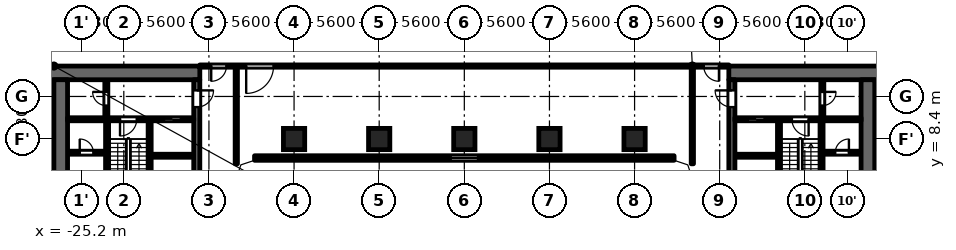
"""IFC4 building model, lengths in metres.
Left out: names, types, materials, properties, quantities, classifications, styles, units other than length and angle.
Written with IfcOpenShell. Run it as: python <this file> out.ifc"""

import sys

from ifc_helpers import new_model, si_unit, direction, frame, frame_2d, origin, origin_2d, place, context, subcontext, project, spatial, polyline, rectangle, outline, extrude, element, fill, save


model = new_model("IFC4")
c1 = context("Model", 3, precision=1e-05, world=origin(), true_north=direction((0.0, 1.0)))
c2 = subcontext(c1, "Body", "Model", "MODEL_VIEW")
j1 = project(units=[si_unit("LENGTHUNIT", "METRE"), si_unit("PLANEANGLEUNIT", "RADIAN")], contexts=[c1])
p1 = place(None, origin())
s1 = spatial("IfcSite", under=j1, at=p1, CompositionType="ELEMENT")
p2 = place(p1, origin())
s2 = spatial("IfcBuilding", under=s1, at=p2, CompositionType="ELEMENT")
p3 = place(p2, frame((0.0, 0.0, 25.7)))
s3 = spatial("IfcBuildingStorey", under=s2, at=p3, CompositionType="ELEMENT", Elevation=25.7)
for number, where, z_axis, x_axis in (
    (1, (-11.2, 8.4, 0.0), (0.0, 0.0, 1.0), (1.0, 0.0, 0.0)),
    (2, (-5.6, 8.4, 0.0), (0.0, 0.0, 1.0), (1.0, 0.0, 0.0)),
    (3, (0.0, 8.4, 0.0), (0.0, 0.0, 1.0), (1.0, 0.0, 0.0)),
    (4, (5.6, 8.4, 0.0), (0.0, 0.0, 1.0), (1.0, 0.0, 0.0)),
    (5, (11.2, 8.4, 0.0), (0.0, 0.0, 1.0), (1.0, 0.0, 0.0)),
):
    element("IfcColumn", number, at=place(p3, frame(where, z_axis=z_axis, x_axis=x_axis)), inside=s3, PredefinedType="COLUMN", context=c2, shape_type="SweptSolid", body=[
        extrude(rectangle(XDim=1.4, YDim=1.4, at=origin_2d()), origin(), (0.0, 0.0, 1.0), 4.8),
    ])
p4 = place(p3, frame((-13.8, 7.15, 0.0), z_axis=(0.0, 0.0, 1.0), x_axis=(1.0, 0.0, 0.0)))
e6 = element("IfcWall", 6, at=p4, inside=s3, PredefinedType="SOLIDWALL", context=c2, shape_type="SweptSolid", body=[
    extrude(rectangle(XDim=27.6, YDim=0.3, at=frame_2d((13.8, 0.0))), origin(), (0.0, 0.0, 1.0), 4.45),
])
p5 = place(p4, frame((12.9, 0.0, 0.9)))
e7 = element("IfcOpeningElement", 7, at=p5, cuts=e6, PredefinedType="OPENING", context=c2, shape_type="SweptSolid", body=[
    extrude(rectangle(XDim=1.8, YDim=1.25, at=frame_2d((0.9, 0.625))), frame((0.0, 0.16, 0.0), z_axis=(0.0, -1.0, 0.0), x_axis=(1.0, 0.0, 0.0)), (0.0, 0.0, 1.0), 0.32),
])
p6 = place(p3, frame((-20.7, 2.6, 0.0), z_axis=(0.0, 0.0, 1.0), x_axis=(0.0, 1.0, 0.0)))
e8 = element("IfcWall", 8, at=p6, inside=s3, PredefinedType="SHEAR", context=c2, shape_type="SweptSolid", body=[
    extrude(rectangle(XDim=7.0, YDim=0.2, at=frame_2d((3.5, 0.0))), origin(), (0.0, 0.0, 1.0), 4.45),
])
p7 = place(p3, frame((-17.4, 12.75, 0.0), z_axis=(0.0, 0.0, 1.0), x_axis=(-1.0, 0.0, 0.0)))
e9 = element("IfcWall", 9, at=p7, inside=s3, PredefinedType="SHEAR", context=c2, shape_type="SweptSolid", body=[
    extrude(rectangle(XDim=10.4, YDim=0.9, at=frame_2d((5.2, 0.0))), origin(), (0.0, 0.0, 1.0), 4.45),
])
p8 = place(p3, frame((-17.6, -12.3, 0.0), z_axis=(0.0, 0.0, 1.0), x_axis=(0.0, 1.0, 0.0)))
e10 = element("IfcWall", 10, at=p8, inside=s3, PredefinedType="SHEAR", context=c2, shape_type="SweptSolid", body=[
    extrude(rectangle(XDim=24.6, YDim=0.4, at=frame_2d((12.3, 0.0))), origin(), (0.0, 0.0, 1.0), 4.45),
])
p9 = place(p8, frame((6.0, 0.0, 0.0)))
e11 = element("IfcOpeningElement", 11, at=p9, cuts=e10, PredefinedType="OPENING", context=c2, shape_type="SweptSolid", body=[
    extrude(rectangle(XDim=1.1, YDim=2.1, at=frame_2d((0.55, 1.05))), frame((0.0, 0.21, 0.0), z_axis=(0.0, -1.0, 0.0), x_axis=(1.0, 0.0, 0.0)), (0.0, 0.0, 1.0), 0.42),
])
p10 = place(p8, frame((8.4, 0.0, 0.0)))
e12 = element("IfcOpeningElement", 12, at=p10, cuts=e10, PredefinedType="OPENING", context=c2, shape_type="SweptSolid", body=[
    extrude(rectangle(XDim=1.1, YDim=2.1, at=frame_2d((0.55, 1.05))), frame((0.0, 0.21, 0.0), z_axis=(0.0, -1.0, 0.0), x_axis=(1.0, 0.0, 0.0)), (0.0, 0.0, 1.0), 0.42),
])
p11 = place(p8, frame((10.8, 0.0, 0.0)))
e13 = element("IfcOpeningElement", 13, at=p11, cuts=e10, PredefinedType="OPENING", context=c2, shape_type="SweptSolid", body=[
    extrude(rectangle(XDim=1.1, YDim=2.1, at=frame_2d((0.55, 1.05))), frame((0.0, 0.21, 0.0), z_axis=(0.0, -1.0, 0.0), x_axis=(1.0, 0.0, 0.0)), (0.0, 0.0, 1.0), 0.42),
])
p12 = place(p8, frame((16.75, 0.0, 0.0)))
e14 = element("IfcOpeningElement", 14, at=p12, cuts=e10, PredefinedType="OPENING", context=c2, shape_type="SweptSolid", body=[
    extrude(rectangle(XDim=0.9, YDim=2.1, at=frame_2d((0.45, 1.05))), frame((0.0, 0.21, 0.0), z_axis=(0.0, -1.0, 0.0), x_axis=(1.0, 0.0, 0.0)), (0.0, 0.0, 1.0), 0.42),
])
p13 = place(p8, frame((22.8, 0.0, 0.0)))
e15 = element("IfcOpeningElement", 15, at=p13, cuts=e10, PredefinedType="OPENING", context=c2, shape_type="SweptSolid", body=[
    extrude(rectangle(XDim=1.1, YDim=2.1, at=frame_2d((0.55, 1.05))), frame((0.0, 0.21, 0.0), z_axis=(0.0, -1.0, 0.0), x_axis=(1.0, 0.0, 0.0)), (0.0, 0.0, 1.0), 0.42),
])
p14 = place(p8, frame((0.7, 0.0, 0.0)))
e16 = element("IfcOpeningElement", 16, at=p14, cuts=e10, PredefinedType="OPENING", context=c2, shape_type="SweptSolid", body=[
    extrude(rectangle(XDim=1.1, YDim=2.1, at=frame_2d((0.55, 1.05))), frame((0.0, 0.21, 0.0), z_axis=(0.0, -1.0, 0.0), x_axis=(1.0, 0.0, 0.0)), (0.0, 0.0, 1.0), 0.42),
])
p15 = place(p8, frame((12.775, 0.0, 0.0)))
e17 = element("IfcOpeningElement", 17, at=p15, cuts=e10, PredefinedType="OPENING", context=c2, shape_type="SweptSolid", body=[
    extrude(rectangle(XDim=1.8, YDim=2.1, at=frame_2d((0.9, 1.05))), frame((0.0, 0.21, 0.0), z_axis=(0.0, -1.0, 0.0), x_axis=(1.0, 0.0, 0.0)), (0.0, 0.0, 1.0), 0.42),
])
p16 = place(p3, frame((-26.55, -12.3, 0.0), z_axis=(0.0, 0.0, 1.0), x_axis=(0.0, 1.0, 0.0)))
e18 = element("IfcWall", 18, at=p16, inside=s3, PredefinedType="SHEAR", context=c2, shape_type="SweptSolid", body=[
    extrude(rectangle(XDim=24.6, YDim=0.9, at=frame_2d((12.3, 0.0))), origin(), (0.0, 0.0, 1.0), 4.45),
])
p17 = place(p3, frame((-23.55, 9.8, 0.0), z_axis=(0.0, 0.0, 1.0), x_axis=(0.0, 1.0, 0.0)))
e19 = element("IfcWall", 19, at=p17, inside=s3, PredefinedType="PARTITIONING", context=c2, shape_type="SweptSolid", body=[
    extrude(rectangle(XDim=2.5, YDim=0.2, at=frame_2d((1.25, 0.0))), origin(), (0.0, 0.0, 1.0), 4.45),
])
p18 = place(p17, frame((0.8, 0.0, 0.0)))
e20 = element("IfcOpeningElement", 20, at=p18, cuts=e19, PredefinedType="OPENING", context=c2, shape_type="SweptSolid", body=[
    extrude(rectangle(XDim=0.9, YDim=2.1, at=frame_2d((0.45, 1.05))), frame((0.0, 0.11, 0.0), z_axis=(0.0, -1.0, 0.0), x_axis=(1.0, 0.0, 0.0)), (0.0, 0.0, 1.0), 0.22),
])
p19 = place(p3, frame((-23.6, 7.5, 0.0), z_axis=(0.0, 0.0, 1.0), x_axis=(-1.0, 0.0, 0.0)))
e21 = element("IfcWall", 21, at=p19, inside=s3, PredefinedType="PARTITIONING", context=c2, shape_type="SweptSolid", body=[
    extrude(rectangle(XDim=2.5, YDim=0.2, at=frame_2d((1.25, 0.0))), origin(), (0.0, 0.0, 1.0), 4.45),
])
p20 = place(p19, frame((0.8, 0.0, 0.0)))
e22 = element("IfcOpeningElement", 22, at=p20, cuts=e21, PredefinedType="OPENING", context=c2, shape_type="SweptSolid", body=[
    extrude(rectangle(XDim=0.9, YDim=2.1, at=frame_2d((0.45, 1.05))), frame((0.0, 0.11, 0.0), z_axis=(0.0, -1.0, 0.0), x_axis=(1.0, 0.0, 0.0)), (0.0, 0.0, 1.0), 0.22),
])
p21 = place(p3, frame((-17.8, 7.3, 0.0), z_axis=(0.0, 0.0, 1.0), x_axis=(-1.0, 0.0, 0.0)))
e23 = element("IfcWall", 23, at=p21, inside=s3, PredefinedType="PARTITIONING", context=c2, shape_type="SweptSolid", body=[
    extrude(rectangle(XDim=2.8, YDim=0.2, at=frame_2d((1.4, 0.0))), origin(), (0.0, 0.0, 1.0), 4.45),
])
p22 = place(p3, frame((-17.8, 9.7, 0.0), z_axis=(0.0, 0.0, 1.0), x_axis=(-1.0, 0.0, 0.0)))
e24 = element("IfcWall", 24, at=p22, inside=s3, PredefinedType="SHEAR", context=c2, shape_type="SweptSolid", body=[
    extrude(rectangle(XDim=8.3, YDim=0.2, at=frame_2d((4.15, 0.0))), origin(), (0.0, 0.0, 1.0), 4.45),
])
p23 = place(p22, frame((0.85, 0.0, 0.0)))
e25 = element("IfcOpeningElement", 25, at=p23, cuts=e24, PredefinedType="OPENING", context=c2, shape_type="SweptSolid", body=[
    extrude(rectangle(XDim=1.1, YDim=2.1, at=frame_2d((0.55, 1.05))), frame((0.0, 0.11, 0.0), z_axis=(0.0, -1.0, 0.0), x_axis=(1.0, 0.0, 0.0)), (0.0, 0.0, 1.0), 0.22),
])
p24 = place(p22, frame((3.75, 0.0, 0.0)))
e26 = element("IfcOpeningElement", 26, at=p24, cuts=e24, PredefinedType="OPENING", context=c2, shape_type="SweptSolid", body=[
    extrude(rectangle(XDim=1.1, YDim=2.1, at=frame_2d((0.55, 1.05))), frame((0.0, 0.11, 0.0), z_axis=(0.0, -1.0, 0.0), x_axis=(1.0, 0.0, 0.0)), (0.0, 0.0, 1.0), 0.22),
])
for number, where, z_axis, x_axis in (
    (27, (-23.5, 2.6, 0.0), (0.0, 0.0, 1.0), (0.0, 1.0, 0.0)),
    (28, (20.7, 2.6, 0.0), (0.0, 0.0, 1.0), (0.0, 1.0, 0.0)),
):
    element("IfcWall", number, at=place(p3, frame(where, z_axis=z_axis, x_axis=x_axis)), inside=s3, PredefinedType="SHEAR", context=c2, shape_type="SweptSolid", body=[
        extrude(rectangle(XDim=7.0, YDim=0.2, at=frame_2d((3.5, 0.0))), origin(), (0.0, 0.0, 1.0), 4.45),
    ])
p25 = place(p3, frame((17.4, 12.75, 0.0), z_axis=(0.0, 0.0, 1.0), x_axis=(1.0, 0.0, 0.0)))
e29 = element("IfcWall", 29, at=p25, inside=s3, PredefinedType="SHEAR", context=c2, shape_type="SweptSolid", body=[
    extrude(rectangle(XDim=10.4, YDim=0.9, at=frame_2d((5.2, 0.0))), origin(), (0.0, 0.0, 1.0), 4.45),
])
p26 = place(p3, frame((17.6, -12.3, 0.0), z_axis=(0.0, 0.0, 1.0), x_axis=(0.0, 1.0, 0.0)))
e30 = element("IfcWall", 30, at=p26, inside=s3, PredefinedType="SHEAR", context=c2, shape_type="SweptSolid", body=[
    extrude(rectangle(XDim=24.6, YDim=0.4, at=frame_2d((12.3, 0.0))), origin(), (0.0, 0.0, 1.0), 4.45),
])
p27 = place(p26, frame((6.0, 0.0, 0.0)))
e31 = element("IfcOpeningElement", 31, at=p27, cuts=e30, PredefinedType="OPENING", context=c2, shape_type="SweptSolid", body=[
    extrude(rectangle(XDim=1.1, YDim=2.1, at=frame_2d((0.55, 1.05))), frame((0.0, 0.21, 0.0), z_axis=(0.0, -1.0, 0.0), x_axis=(1.0, 0.0, 0.0)), (0.0, 0.0, 1.0), 0.42),
])
p28 = place(p26, frame((8.4, 0.0, 0.0)))
e32 = element("IfcOpeningElement", 32, at=p28, cuts=e30, PredefinedType="OPENING", context=c2, shape_type="SweptSolid", body=[
    extrude(rectangle(XDim=1.1, YDim=2.1, at=frame_2d((0.55, 1.05))), frame((0.0, 0.21, 0.0), z_axis=(0.0, -1.0, 0.0), x_axis=(1.0, 0.0, 0.0)), (0.0, 0.0, 1.0), 0.42),
])
p29 = place(p26, frame((10.8, 0.0, 0.0)))
e33 = element("IfcOpeningElement", 33, at=p29, cuts=e30, PredefinedType="OPENING", context=c2, shape_type="SweptSolid", body=[
    extrude(rectangle(XDim=1.1, YDim=2.1, at=frame_2d((0.55, 1.05))), frame((0.0, 0.21, 0.0), z_axis=(0.0, -1.0, 0.0), x_axis=(1.0, 0.0, 0.0)), (0.0, 0.0, 1.0), 0.42),
])
p30 = place(p26, frame((16.75, 0.0, 0.0)))
e34 = element("IfcOpeningElement", 34, at=p30, cuts=e30, PredefinedType="OPENING", context=c2, shape_type="SweptSolid", body=[
    extrude(rectangle(XDim=0.9, YDim=2.1, at=frame_2d((0.45, 1.05))), frame((0.0, 0.21, 0.0), z_axis=(0.0, -1.0, 0.0), x_axis=(1.0, 0.0, 0.0)), (0.0, 0.0, 1.0), 0.42),
])
p31 = place(p26, frame((22.8, 0.0, 0.0)))
e35 = element("IfcOpeningElement", 35, at=p31, cuts=e30, PredefinedType="OPENING", context=c2, shape_type="SweptSolid", body=[
    extrude(rectangle(XDim=1.1, YDim=2.1, at=frame_2d((0.55, 1.05))), frame((0.0, 0.21, 0.0), z_axis=(0.0, -1.0, 0.0), x_axis=(1.0, 0.0, 0.0)), (0.0, 0.0, 1.0), 0.42),
])
p32 = place(p26, frame((0.7, 0.0, 0.0)))
e36 = element("IfcOpeningElement", 36, at=p32, cuts=e30, PredefinedType="OPENING", context=c2, shape_type="SweptSolid", body=[
    extrude(rectangle(XDim=1.1, YDim=2.1, at=frame_2d((0.55, 1.05))), frame((0.0, 0.21, 0.0), z_axis=(0.0, -1.0, 0.0), x_axis=(1.0, 0.0, 0.0)), (0.0, 0.0, 1.0), 0.42),
])
p33 = place(p26, frame((12.775, 0.0, 0.0)))
e37 = element("IfcOpeningElement", 37, at=p33, cuts=e30, PredefinedType="OPENING", context=c2, shape_type="SweptSolid", body=[
    extrude(rectangle(XDim=1.8, YDim=2.1, at=frame_2d((0.9, 1.05))), frame((0.0, 0.21, 0.0), z_axis=(0.0, -1.0, 0.0), x_axis=(1.0, 0.0, 0.0)), (0.0, 0.0, 1.0), 0.42),
])
p34 = place(p3, frame((26.55, -12.3, 0.0), z_axis=(0.0, 0.0, 1.0), x_axis=(0.0, 1.0, 0.0)))
e38 = element("IfcWall", 38, at=p34, inside=s3, PredefinedType="SHEAR", context=c2, shape_type="SweptSolid", body=[
    extrude(rectangle(XDim=24.6, YDim=0.9, at=frame_2d((12.3, 0.0))), origin(), (0.0, 0.0, 1.0), 4.45),
])
p35 = place(p3, frame((23.55, 9.8, 0.0), z_axis=(0.0, 0.0, 1.0), x_axis=(0.0, 1.0, 0.0)))
e39 = element("IfcWall", 39, at=p35, inside=s3, PredefinedType="PARTITIONING", context=c2, shape_type="SweptSolid", body=[
    extrude(rectangle(XDim=2.5, YDim=0.2, at=frame_2d((1.25, 0.0))), origin(), (0.0, 0.0, 1.0), 4.45),
])
p36 = place(p35, frame((0.8, 0.0, 0.0)))
e40 = element("IfcOpeningElement", 40, at=p36, cuts=e39, PredefinedType="OPENING", context=c2, shape_type="SweptSolid", body=[
    extrude(rectangle(XDim=0.9, YDim=2.1, at=frame_2d((0.45, 1.05))), frame((0.0, 0.11, 0.0), z_axis=(0.0, -1.0, 0.0), x_axis=(1.0, 0.0, 0.0)), (0.0, 0.0, 1.0), 0.22),
])
p37 = place(p3, frame((23.6, 7.5, 0.0), z_axis=(0.0, 0.0, 1.0), x_axis=(1.0, 0.0, 0.0)))
e41 = element("IfcWall", 41, at=p37, inside=s3, PredefinedType="PARTITIONING", context=c2, shape_type="SweptSolid", body=[
    extrude(rectangle(XDim=2.5, YDim=0.2, at=frame_2d((1.25, 0.0))), origin(), (0.0, 0.0, 1.0), 4.45),
])
p38 = place(p37, frame((0.8, 0.0, 0.0)))
e42 = element("IfcOpeningElement", 42, at=p38, cuts=e41, PredefinedType="OPENING", context=c2, shape_type="SweptSolid", body=[
    extrude(rectangle(XDim=0.9, YDim=2.1, at=frame_2d((0.45, 1.05))), frame((0.0, 0.11, 0.0), z_axis=(0.0, -1.0, 0.0), x_axis=(1.0, 0.0, 0.0)), (0.0, 0.0, 1.0), 0.22),
])
p39 = place(p3, frame((17.8, 7.3, 0.0), z_axis=(0.0, 0.0, 1.0), x_axis=(1.0, 0.0, 0.0)))
e43 = element("IfcWall", 43, at=p39, inside=s3, PredefinedType="PARTITIONING", context=c2, shape_type="SweptSolid", body=[
    extrude(rectangle(XDim=2.8, YDim=0.2, at=frame_2d((1.4, 0.0))), origin(), (0.0, 0.0, 1.0), 4.45),
])
p40 = place(p3, frame((17.8, 9.7, 0.0), z_axis=(0.0, 0.0, 1.0), x_axis=(1.0, 0.0, 0.0)))
e44 = element("IfcWall", 44, at=p40, inside=s3, PredefinedType="SHEAR", context=c2, shape_type="SweptSolid", body=[
    extrude(rectangle(XDim=8.3, YDim=0.2, at=frame_2d((4.15, 0.0))), origin(), (0.0, 0.0, 1.0), 4.45),
])
p41 = place(p40, frame((0.85, 0.0, 0.0)))
e45 = element("IfcOpeningElement", 45, at=p41, cuts=e44, PredefinedType="OPENING", context=c2, shape_type="SweptSolid", body=[
    extrude(rectangle(XDim=1.1, YDim=2.1, at=frame_2d((0.55, 1.05))), frame((0.0, 0.11, 0.0), z_axis=(0.0, -1.0, 0.0), x_axis=(1.0, 0.0, 0.0)), (0.0, 0.0, 1.0), 0.22),
])
p42 = place(p40, frame((3.75, 0.0, 0.0)))
e46 = element("IfcOpeningElement", 46, at=p42, cuts=e44, PredefinedType="OPENING", context=c2, shape_type="SweptSolid", body=[
    extrude(rectangle(XDim=1.1, YDim=2.1, at=frame_2d((0.55, 1.05))), frame((0.0, 0.11, 0.0), z_axis=(0.0, -1.0, 0.0), x_axis=(1.0, 0.0, 0.0)), (0.0, 0.0, 1.0), 0.22),
])
p43 = place(p3, frame((23.5, 2.6, 0.0), z_axis=(0.0, 0.0, 1.0), x_axis=(0.0, 1.0, 0.0)))
e47 = element("IfcWall", 47, at=p43, inside=s3, PredefinedType="SHEAR", context=c2, shape_type="SweptSolid", body=[
    extrude(rectangle(XDim=7.0, YDim=0.2, at=frame_2d((3.5, 0.0))), origin(), (0.0, 0.0, 1.0), 4.45),
])
p44 = place(p3, frame((-17.4, 13.2, 0.0), z_axis=(0.0, 0.0, 1.0), x_axis=(1.0, 0.0, 0.0)))
e48 = element("IfcWall", 48, at=p44, inside=s3, PredefinedType="PARTITIONING", context=c2, shape_type="SweptSolid", body=[
    extrude(rectangle(XDim=34.8, YDim=0.15, at=frame_2d((17.4, 0.0))), origin(), (0.0, 0.0, 1.0), 4.45),
])
p45 = place(p44, frame((3.05, 0.0, 0.0)))
e49 = element("IfcOpeningElement", 49, at=p45, cuts=e48, PredefinedType="OPENING", context=c2, shape_type="SweptSolid", body=[
    extrude(rectangle(XDim=1.8, YDim=2.1, at=frame_2d((0.9, 1.05))), frame((0.0, 0.085, 0.0), z_axis=(0.0, -1.0, 0.0), x_axis=(1.0, 0.0, 0.0)), (0.0, 0.0, 1.0), 0.17),
])
p46 = place(p44, frame((0.75, 0.0, 0.0)))
e50 = element("IfcOpeningElement", 50, at=p46, cuts=e48, PredefinedType="OPENING", context=c2, shape_type="SweptSolid", body=[
    extrude(rectangle(XDim=1.0, YDim=2.1, at=frame_2d((0.5, 1.05))), frame((0.0, 0.085, 0.0), z_axis=(0.0, -1.0, 0.0), x_axis=(1.0, 0.0, 0.0)), (0.0, 0.0, 1.0), 0.17),
])
p47 = place(p44, frame((33.15, 0.0, 0.0)))
e51 = element("IfcOpeningElement", 51, at=p47, cuts=e48, PredefinedType="OPENING", context=c2, shape_type="SweptSolid", body=[
    extrude(rectangle(XDim=1.0, YDim=2.1, at=frame_2d((0.5, 1.05))), frame((0.0, 0.085, 0.0), z_axis=(0.0, -1.0, 0.0), x_axis=(1.0, 0.0, 0.0)), (0.0, 0.0, 1.0), 0.17),
])
for number, where, z_axis, x_axis in (
    (52, (-15.0, 6.769, 0.0), (0.0, 0.0, 1.0), (0.0, 1.0, 0.0)),
    (53, (15.0, 6.769, 0.0), (0.0, 0.0, 1.0), (0.0, 1.0, 0.0)),
):
    element("IfcWall", number, at=place(p3, frame(where, z_axis=z_axis, x_axis=x_axis)), inside=s3, PredefinedType="PARTITIONING", context=c2, shape_type="SweptSolid", body=[
        extrude(rectangle(XDim=6.356, YDim=0.15, at=frame_2d((3.178, 0.0))), origin(), (0.0, 0.0, 1.0), 4.45),
    ])
p48 = place(p3, origin())
e54 = element("IfcWall", 54, at=p48, inside=s3, PredefinedType="SOLIDWALL", context=c2, shape_type="SweptSolid", body=[
    extrude(outline(polyline([(-13.849, 7.3), (-14.937, 6.937), (-15.3, 5.849), (-15.3, 5.8), (-15.0, 5.8), (-14.7, 6.7), (-13.8, 7.0), (-13.8, 7.3), (-13.849, 7.3)])), origin(), (0.0, 0.0, 1.0), 4.45),
])
e55 = element("IfcWall", 55, at=p48, inside=s3, PredefinedType="SOLIDWALL", context=c2, shape_type="SweptSolid", body=[
    extrude(outline(polyline([(14.937, 6.937), (13.849, 7.3), (13.8, 7.3), (13.8, 7.0), (14.7, 6.7), (15.0, 5.8), (15.3, 5.8), (15.3, 5.849), (14.937, 6.937)])), origin(), (0.0, 0.0, 1.0), 4.45),
])
p49 = place(p23, origin())
e56 = element("IfcDoor", 56, at=p49, inside=s3, OperationType="DOUBLE_DOOR_SLIDING", PredefinedType="DOOR", context=c2, shape_type="SweptSolid", body=[
    extrude(rectangle(XDim=1.1, YDim=2.1, at=frame_2d((0.55, 1.05))), frame((0.0, 0.025, 0.0), z_axis=(0.0, -1.0, 0.0), x_axis=(1.0, 0.0, 0.0)), (0.0, 0.0, 1.0), 0.05),
])
fill(e25, e56)
p50 = place(p13, origin())
e57 = element("IfcDoor", 57, at=p50, inside=s3, OperationType="SINGLE_SWING_RIGHT", PredefinedType="DOOR", context=c2, shape_type="SweptSolid", body=[
    extrude(rectangle(XDim=1.1, YDim=2.1, at=frame_2d((0.55, 1.05))), frame((0.0, 0.025, 0.0), z_axis=(0.0, -1.0, 0.0), x_axis=(1.0, 0.0, 0.0)), (0.0, 0.0, 1.0), 0.05),
])
fill(e15, e57)
p51 = place(p18, origin())
e58 = element("IfcDoor", 58, at=p51, inside=s3, OperationType="SINGLE_SWING_LEFT", PredefinedType="DOOR", context=c2, shape_type="SweptSolid", body=[
    extrude(rectangle(XDim=0.9, YDim=2.1, at=frame_2d((0.45, 1.05))), frame((0.0, 0.025, 0.0), z_axis=(0.0, -1.0, 0.0), x_axis=(1.0, 0.0, 0.0)), (0.0, 0.0, 1.0), 0.05),
])
fill(e20, e58)
p52 = place(p24, origin())
e59 = element("IfcDoor", 59, at=p52, inside=s3, OperationType="SINGLE_SWING_LEFT", PredefinedType="DOOR", context=c2, shape_type="SweptSolid", body=[
    extrude(rectangle(XDim=1.1, YDim=2.1, at=frame_2d((0.55, 1.05))), frame((0.0, 0.025, 0.0), z_axis=(0.0, -1.0, 0.0), x_axis=(1.0, 0.0, 0.0)), (0.0, 0.0, 1.0), 0.05),
])
fill(e26, e59)
p53 = place(p20, origin())
e60 = element("IfcDoor", 60, at=p53, inside=s3, OperationType="SINGLE_SWING_RIGHT", PredefinedType="DOOR", context=c2, shape_type="SweptSolid", body=[
    extrude(rectangle(XDim=0.9, YDim=2.1, at=frame_2d((0.45, 1.05))), frame((0.0, 0.025, 0.0), z_axis=(0.0, -1.0, 0.0), x_axis=(1.0, 0.0, 0.0)), (0.0, 0.0, 1.0), 0.05),
])
fill(e22, e60)
p54 = place(p41, origin())
e61 = element("IfcDoor", 61, at=p54, inside=s3, OperationType="DOUBLE_DOOR_SLIDING", PredefinedType="DOOR", context=c2, shape_type="SweptSolid", body=[
    extrude(rectangle(XDim=1.1, YDim=2.1, at=frame_2d((0.55, 1.05))), frame((0.0, 0.025, 0.0), z_axis=(0.0, -1.0, 0.0), x_axis=(1.0, 0.0, 0.0)), (0.0, 0.0, 1.0), 0.05),
])
fill(e45, e61)
p55 = place(p31, origin())
e62 = element("IfcDoor", 62, at=p55, inside=s3, OperationType="SINGLE_SWING_LEFT", PredefinedType="DOOR", context=c2, shape_type="SweptSolid", body=[
    extrude(rectangle(XDim=1.1, YDim=2.1, at=frame_2d((0.55, 1.05))), frame((0.0, 0.025, 0.0), z_axis=(0.0, -1.0, 0.0), x_axis=(1.0, 0.0, 0.0)), (0.0, 0.0, 1.0), 0.05),
])
fill(e35, e62)
p56 = place(p36, origin())
e63 = element("IfcDoor", 63, at=p56, inside=s3, OperationType="SINGLE_SWING_RIGHT", PredefinedType="DOOR", context=c2, shape_type="SweptSolid", body=[
    extrude(rectangle(XDim=0.9, YDim=2.1, at=frame_2d((0.45, 1.05))), frame((0.0, 0.025, 0.0), z_axis=(0.0, -1.0, 0.0), x_axis=(1.0, 0.0, 0.0)), (0.0, 0.0, 1.0), 0.05),
])
fill(e40, e63)
p57 = place(p42, origin())
e64 = element("IfcDoor", 64, at=p57, inside=s3, OperationType="SINGLE_SWING_RIGHT", PredefinedType="DOOR", context=c2, shape_type="SweptSolid", body=[
    extrude(rectangle(XDim=1.1, YDim=2.1, at=frame_2d((0.55, 1.05))), frame((0.0, 0.025, 0.0), z_axis=(0.0, -1.0, 0.0), x_axis=(1.0, 0.0, 0.0)), (0.0, 0.0, 1.0), 0.05),
])
fill(e46, e64)
p58 = place(p38, origin())
e65 = element("IfcDoor", 65, at=p58, inside=s3, OperationType="SINGLE_SWING_LEFT", PredefinedType="DOOR", context=c2, shape_type="SweptSolid", body=[
    extrude(rectangle(XDim=0.9, YDim=2.1, at=frame_2d((0.45, 1.05))), frame((0.0, 0.025, 0.0), z_axis=(0.0, -1.0, 0.0), x_axis=(1.0, 0.0, 0.0)), (0.0, 0.0, 1.0), 0.05),
])
fill(e42, e65)
p59 = place(p45, origin())
e66 = element("IfcDoor", 66, at=p59, inside=s3, OperationType="SINGLE_SWING_LEFT", PredefinedType="DOOR", context=c2, shape_type="SweptSolid", body=[
    extrude(rectangle(XDim=1.8, YDim=2.1, at=frame_2d((0.9, 1.05))), frame((0.0, 0.025, 0.0), z_axis=(0.0, -1.0, 0.0), x_axis=(1.0, 0.0, 0.0)), (0.0, 0.0, 1.0), 0.05),
])
fill(e49, e66)
p60 = place(p46, origin())
e67 = element("IfcDoor", 67, at=p60, inside=s3, OperationType="SINGLE_SWING_LEFT", PredefinedType="DOOR", context=c2, shape_type="SweptSolid", body=[
    extrude(rectangle(XDim=1.0, YDim=2.1, at=frame_2d((0.5, 1.05))), frame((0.0, 0.025, 0.0), z_axis=(0.0, -1.0, 0.0), x_axis=(1.0, 0.0, 0.0)), (0.0, 0.0, 1.0), 0.05),
])
fill(e50, e67)
p61 = place(p47, origin())
e68 = element("IfcDoor", 68, at=p61, inside=s3, OperationType="SINGLE_SWING_RIGHT", PredefinedType="DOOR", context=c2, shape_type="SweptSolid", body=[
    extrude(rectangle(XDim=1.0, YDim=2.1, at=frame_2d((0.5, 1.05))), frame((0.0, 0.025, 0.0), z_axis=(0.0, -1.0, 0.0), x_axis=(1.0, 0.0, 0.0)), (0.0, 0.0, 1.0), 0.05),
])
fill(e51, e68)
p62 = place(p5, origin())
e69 = element("IfcWindow", 69, at=p62, inside=s3, PartitioningType="SINGLE_PANEL", PredefinedType="WINDOW", context=c2, shape_type="SweptSolid", body=[
    extrude(rectangle(XDim=1.8, YDim=1.25, at=frame_2d((0.9, 0.625))), frame((0.0, 0.03, 0.0), z_axis=(0.0, -1.0, 0.0), x_axis=(1.0, 0.0, 0.0)), (0.0, 0.0, 1.0), 0.06),
])
fill(e7, e69)
save(model, sys.argv[1])
